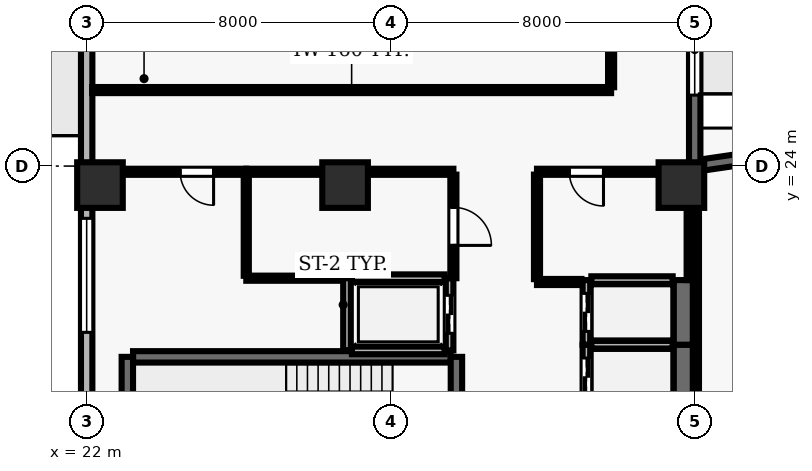
"""IFC4 building model, lengths in metres.
Left out: names, types, materials, properties, quantities, classifications, styles, units other than length and angle.
Written with IfcOpenShell. Run it as: python <this file> out.ifc"""

import sys

from ifc_helpers import new_model, si_unit, direction, frame, frame_2d, origin, origin_2d, place, context, subcontext, project, spatial, rectangle, extrude, element, fill, save


model = new_model("IFC4")
c1 = context("Model", 3, precision=1e-05, world=origin(), true_north=direction((0.0, 1.0)))
c2 = subcontext(c1, "Body", "Model", "MODEL_VIEW")
j1 = project(units=[si_unit("LENGTHUNIT", "METRE"), si_unit("PLANEANGLEUNIT", "RADIAN")], contexts=[c1])
p1 = place(None, origin())
s1 = spatial("IfcSite", under=j1, at=p1, CompositionType="ELEMENT")
p2 = place(p1, origin())
s2 = spatial("IfcBuilding", under=s1, at=p2, CompositionType="ELEMENT")
p3 = place(p2, frame((0.0, 0.0, 146.3)))
s3 = spatial("IfcBuildingStorey", under=s2, at=p3, CompositionType="ELEMENT", Elevation=146.3)
for number, where, z_axis, x_axis in (
    (1, (22.35, 23.5, 0.0), (0.0, 0.0, 1.0), (1.0, 0.0, 0.0)),
    (2, (28.8, 23.5, 0.0), (0.0, 0.0, 1.0), (1.0, 0.0, 0.0)),
    (3, (37.65, 23.5, 0.0), (0.0, 0.0, 1.0), (1.0, 0.0, 0.0)),
):
    element("IfcColumn", number, at=place(p3, frame(where, z_axis=z_axis, x_axis=x_axis)), inside=s3, PredefinedType="COLUMN", context=c2, shape_type="SweptSolid", body=[
        extrude(rectangle(XDim=1.2, YDim=1.2, at=origin_2d()), origin(), (0.0, 0.0, 1.0), 3.9),
    ])
p4 = place(p3, frame((44.846, 25.0, 0.0), z_axis=(0.0, 0.0, 1.0), x_axis=(-0.989499256162, -0.144537960602, 0.0)))
e4 = element("IfcWall", 4, at=p4, inside=s3, PredefinedType="SOLIDWALL", context=c2, shape_type="SweptSolid", body=[
    extrude(rectangle(XDim=6.919, YDim=0.3, at=frame_2d((3.459, 0.0))), origin(), (0.0, 0.0, 1.0), 3.69),
])
p5 = place(p4, frame((2.523, 0.0, 0.9)))
e5 = element("IfcOpeningElement", 5, at=p5, cuts=e4, PredefinedType="OPENING", context=c2, shape_type="SweptSolid", body=[
    extrude(rectangle(XDim=1.8, YDim=1.8, at=frame_2d((0.9, 0.9))), frame((0.0, 0.16, 0.0), z_axis=(0.0, -1.0, 0.0), x_axis=(1.0, 0.0, 0.0)), (0.0, 0.0, 1.0), 0.32),
])
p6 = place(p3, frame((38.0, 24.0, 0.0), z_axis=(0.0, 0.0, 1.0), x_axis=(0.0, 1.0, 0.0)))
e6 = element("IfcWall", 6, at=p6, inside=s3, PredefinedType="SOLIDWALL", context=c2, shape_type="SweptSolid", body=[
    extrude(rectangle(XDim=22.1, YDim=0.3, at=frame_2d((11.05, 0.0))), origin(), (0.0, 0.0, 1.0), 3.69),
])
p7 = place(p6, frame((12.35, 0.0, 0.0)))
e7 = element("IfcOpeningElement", 7, at=p7, cuts=e6, PredefinedType="OPENING", context=c2, shape_type="SweptSolid", body=[
    extrude(rectangle(XDim=1.0, YDim=2.2, at=frame_2d((0.5, 1.1))), frame((0.0, 0.16, 0.0), z_axis=(0.0, -1.0, 0.0), x_axis=(1.0, 0.0, 0.0)), (0.0, 0.0, 1.0), 0.32),
])
p8 = place(p6, frame((1.867, 0.0, 0.9)))
e8 = element("IfcOpeningElement", 8, at=p8, cuts=e6, PredefinedType="OPENING", context=c2, shape_type="SweptSolid", body=[
    extrude(rectangle(XDim=2.4, YDim=1.8, at=frame_2d((1.2, 0.9))), frame((0.0, 0.16, 0.0), z_axis=(0.0, -1.0, 0.0), x_axis=(1.0, 0.0, 0.0)), (0.0, 0.0, 1.0), 0.32),
])
p9 = place(p6, frame((16.833, 0.0, 0.9)))
e9 = element("IfcOpeningElement", 9, at=p9, cuts=e6, PredefinedType="OPENING", context=c2, shape_type="SweptSolid", body=[
    extrude(rectangle(XDim=2.4, YDim=1.8, at=frame_2d((1.2, 0.9))), frame((0.0, 0.16, 0.0), z_axis=(0.0, -1.0, 0.0), x_axis=(1.0, 0.0, 0.0)), (0.0, 0.0, 1.0), 0.32),
])
p10 = place(p3, frame((22.0, 46.1, 0.0), z_axis=(0.0, 0.0, 1.0), x_axis=(0.0, -1.0, 0.0)))
e10 = element("IfcWall", 10, at=p10, inside=s3, PredefinedType="SOLIDWALL", context=c2, shape_type="SweptSolid", body=[
    extrude(rectangle(XDim=43.6, YDim=0.3, at=frame_2d((21.8, 0.0))), origin(), (0.0, 0.0, 1.0), 3.69),
])
p11 = place(p10, frame((12.7, 0.0, 0.0)))
e11 = element("IfcOpeningElement", 11, at=p11, cuts=e10, PredefinedType="OPENING", context=c2, shape_type="SweptSolid", body=[
    extrude(rectangle(XDim=1.0, YDim=2.2, at=frame_2d((0.5, 1.1))), frame((0.0, 0.16, 0.0), z_axis=(0.0, -1.0, 0.0), x_axis=(1.0, 0.0, 0.0)), (0.0, 0.0, 1.0), 0.32),
])
p12 = place(p10, frame((1.225, 0.0, 0.9)))
e12 = element("IfcOpeningElement", 12, at=p12, cuts=e10, PredefinedType="OPENING", context=c2, shape_type="SweptSolid", body=[
    extrude(rectangle(XDim=3.0, YDim=2.2, at=frame_2d((1.5, 1.1))), frame((0.0, 0.16, 0.0), z_axis=(0.0, -1.0, 0.0), x_axis=(1.0, 0.0, 0.0)), (0.0, 0.0, 1.0), 0.32),
])
p13 = place(p10, frame((6.675, 0.0, 0.9)))
e13 = element("IfcOpeningElement", 13, at=p13, cuts=e10, PredefinedType="OPENING", context=c2, shape_type="SweptSolid", body=[
    extrude(rectangle(XDim=3.0, YDim=2.2, at=frame_2d((1.5, 1.1))), frame((0.0, 0.16, 0.0), z_axis=(0.0, -1.0, 0.0), x_axis=(1.0, 0.0, 0.0)), (0.0, 0.0, 1.0), 0.32),
])
p14 = place(p10, frame((23.475, 0.0, 0.9)))
e14 = element("IfcOpeningElement", 14, at=p14, cuts=e10, PredefinedType="OPENING", context=c2, shape_type="SweptSolid", body=[
    extrude(rectangle(XDim=3.0, YDim=2.2, at=frame_2d((1.5, 1.1))), frame((0.0, 0.16, 0.0), z_axis=(0.0, -1.0, 0.0), x_axis=(1.0, 0.0, 0.0)), (0.0, 0.0, 1.0), 0.32),
])
p15 = place(p10, frame((33.925, 0.0, 0.9)))
e15 = element("IfcOpeningElement", 15, at=p15, cuts=e10, PredefinedType="OPENING", context=c2, shape_type="SweptSolid", body=[
    extrude(rectangle(XDim=3.0, YDim=2.2, at=frame_2d((1.5, 1.1))), frame((0.0, 0.16, 0.0), z_axis=(0.0, -1.0, 0.0), x_axis=(1.0, 0.0, 0.0)), (0.0, 0.0, 1.0), 0.32),
])
p16 = place(p3, frame((31.58, 18.98, 0.0), z_axis=(0.0, 0.0, 1.0), x_axis=(-1.0, 0.0, 0.0)))
e16 = element("IfcWall", 16, at=p16, inside=s3, PredefinedType="SHEAR", context=c2, shape_type="SweptSolid", body=[
    extrude(rectangle(XDim=8.36, YDim=0.3, at=frame_2d((4.18, 0.0))), origin(), (0.0, 0.0, 1.0), 3.69),
])
p17 = place(p3, frame((23.07, 18.98, 0.0), z_axis=(0.0, 0.0, 1.0), x_axis=(0.0, -1.0, 0.0)))
e17 = element("IfcWall", 17, at=p17, inside=s3, PredefinedType="SHEAR", context=c2, shape_type="SweptSolid", body=[
    extrude(rectangle(XDim=3.51, YDim=0.3, at=frame_2d((1.755, 0.0))), origin(), (0.0, 0.0, 1.0), 3.69),
])
p18 = place(p3, frame((31.73, 15.47, 0.0), z_axis=(0.0, 0.0, 1.0), x_axis=(0.0, 1.0, 0.0)))
e18 = element("IfcWall", 18, at=p18, inside=s3, PredefinedType="SHEAR", context=c2, shape_type="SweptSolid", body=[
    extrude(rectangle(XDim=3.51, YDim=0.3, at=frame_2d((1.755, 0.0))), origin(), (0.0, 0.0, 1.0), 3.69),
])
p19 = place(p18, frame((1.18, 0.0, 0.0)))
e19 = element("IfcOpeningElement", 19, at=p19, cuts=e18, PredefinedType="OPENING", context=c2, shape_type="SweptSolid", body=[
    extrude(rectangle(XDim=1.15, YDim=2.15, at=frame_2d((0.575, 1.075))), frame((0.0, 0.16, 0.0), z_axis=(0.0, -1.0, 0.0), x_axis=(1.0, 0.0, 0.0)), (0.0, 0.0, 1.0), 0.32),
])
p20 = place(p3, frame((35.15, 19.3, 0.0), z_axis=(0.0, 0.0, 1.0), x_axis=(0.0, -1.0, 0.0)))
e20 = element("IfcWall", 20, at=p20, inside=s3, PredefinedType="SOLIDWALL", context=c2, shape_type="SweptSolid", body=[
    extrude(rectangle(XDim=1.7, YDim=0.2, at=frame_2d((0.85, 0.0))), origin(), (0.0, 0.0, 1.0), 3.69),
])
p21 = place(p20, frame((0.35, 0.0, 0.0)))
e21 = element("IfcOpeningElement", 21, at=p21, cuts=e20, PredefinedType="OPENING", context=c2, shape_type="SweptSolid", body=[
    extrude(rectangle(XDim=1.0, YDim=2.1, at=frame_2d((0.5, 1.05))), frame((0.0, 0.11, 0.0), z_axis=(0.0, -1.0, 0.0), x_axis=(1.0, 0.0, 0.0)), (0.0, 0.0, 1.0), 0.22),
])
p22 = place(p3, frame((37.7, 17.6, 0.0), z_axis=(0.0, 0.0, 1.0), x_axis=(0.0, 1.0, 0.0)))
e22 = element("IfcWall", 22, at=p22, inside=s3, PredefinedType="SHEAR", context=c2, shape_type="SweptSolid", body=[
    extrude(rectangle(XDim=1.7, YDim=0.5, at=frame_2d((0.85, 0.0))), origin(), (0.0, 0.0, 1.0), 3.69),
])
p23 = place(p3, frame((37.42, 19.3, 0.0), z_axis=(0.0, 0.0, 1.0), x_axis=(-1.0, 0.0, 0.0)))
e23 = element("IfcWall", 23, at=p23, inside=s3, PredefinedType="SOLIDWALL", context=c2, shape_type="SweptSolid", body=[
    extrude(rectangle(XDim=2.14, YDim=0.2, at=frame_2d((1.07, 0.0))), origin(), (0.0, 0.0, 1.0), 3.69),
])
p24 = place(p3, frame((35.15, 21.0, 0.0), z_axis=(0.0, 0.0, 1.0), x_axis=(0.0, -1.0, 0.0)))
e24 = element("IfcWall", 24, at=p24, inside=s3, PredefinedType="SOLIDWALL", context=c2, shape_type="SweptSolid", body=[
    extrude(rectangle(XDim=1.7, YDim=0.2, at=frame_2d((0.85, 0.0))), origin(), (0.0, 0.0, 1.0), 3.69),
])
p25 = place(p24, frame((0.35, 0.0, 0.0)))
e25 = element("IfcOpeningElement", 25, at=p25, cuts=e24, PredefinedType="OPENING", context=c2, shape_type="SweptSolid", body=[
    extrude(rectangle(XDim=1.0, YDim=2.1, at=frame_2d((0.5, 1.05))), frame((0.0, 0.11, 0.0), z_axis=(0.0, -1.0, 0.0), x_axis=(1.0, 0.0, 0.0)), (0.0, 0.0, 1.0), 0.22),
])
p26 = place(p3, frame((37.7, 19.3, 0.0), z_axis=(0.0, 0.0, 1.0), x_axis=(0.0, 1.0, 0.0)))
e26 = element("IfcWall", 26, at=p26, inside=s3, PredefinedType="SHEAR", context=c2, shape_type="SweptSolid", body=[
    extrude(rectangle(XDim=1.7, YDim=0.5, at=frame_2d((0.85, 0.0))), origin(), (0.0, 0.0, 1.0), 3.69),
])
p27 = place(p3, frame((37.42, 21.0, 0.0), z_axis=(0.0, 0.0, 1.0), x_axis=(-1.0, 0.0, 0.0)))
e27 = element("IfcWall", 27, at=p27, inside=s3, PredefinedType="SOLIDWALL", context=c2, shape_type="SweptSolid", body=[
    extrude(rectangle(XDim=2.14, YDim=0.2, at=frame_2d((1.07, 0.0))), origin(), (0.0, 0.0, 1.0), 3.69),
])
p28 = place(p3, frame((28.85, 21.05, 0.0), z_axis=(0.0, 0.0, 1.0), x_axis=(0.0, -1.0, 0.0)))
e28 = element("IfcWall", 28, at=p28, inside=s3, PredefinedType="SOLIDWALL", context=c2, shape_type="SweptSolid", body=[
    extrude(rectangle(XDim=1.9, YDim=0.2, at=frame_2d((0.95, 0.0))), origin(), (0.0, 0.0, 1.0), 3.69),
])
p29 = place(p3, frame((31.55, 19.15, 0.0), z_axis=(0.0, 0.0, 1.0), x_axis=(0.0, 1.0, 0.0)))
e29 = element("IfcWall", 29, at=p29, inside=s3, PredefinedType="SOLIDWALL", context=c2, shape_type="SweptSolid", body=[
    extrude(rectangle(XDim=1.9, YDim=0.2, at=frame_2d((0.95, 0.0))), origin(), (0.0, 0.0, 1.0), 3.69),
])
p30 = place(p29, frame((0.45, 0.0, 0.0)))
e30 = element("IfcOpeningElement", 30, at=p30, cuts=e29, PredefinedType="OPENING", context=c2, shape_type="SweptSolid", body=[
    extrude(rectangle(XDim=1.0, YDim=2.1, at=frame_2d((0.5, 1.05))), frame((0.0, 0.11, 0.0), z_axis=(0.0, -1.0, 0.0), x_axis=(1.0, 0.0, 0.0)), (0.0, 0.0, 1.0), 0.22),
])
for number, where, z_axis, x_axis in (
    (31, (28.98, 19.15, 0.0), (0.0, 0.0, 1.0), (1.0, 0.0, 0.0)),
    (32, (31.42, 21.05, 0.0), (0.0, 0.0, 1.0), (-1.0, 0.0, 0.0)),
):
    element("IfcWall", number, at=place(p3, frame(where, z_axis=z_axis, x_axis=x_axis)), inside=s3, PredefinedType="SOLIDWALL", context=c2, shape_type="SweptSolid", body=[
        extrude(rectangle(XDim=2.44, YDim=0.2, at=frame_2d((1.22, 0.0))), origin(), (0.0, 0.0, 1.0), 3.69),
    ])
p31 = place(p3, frame((26.2, 21.05, 0.0), z_axis=(0.0, 0.0, 1.0), x_axis=(1.0, 0.0, 0.0)))
e33 = element("IfcWall", 33, at=p31, inside=s3, PredefinedType="PARTITIONING", context=c2, shape_type="SweptSolid", body=[
    extrude(rectangle(XDim=2.52, YDim=0.135, at=frame_2d((1.26, 0.0))), origin(), (0.0, 0.0, 1.0), 3.69),
])
p32 = place(p3, frame((26.2, 23.85, 0.0), z_axis=(0.0, 0.0, 1.0), x_axis=(-1.0, 0.0, 0.0)))
e34 = element("IfcWall", 34, at=p32, inside=s3, PredefinedType="PARTITIONING", context=c2, shape_type="SweptSolid", body=[
    extrude(rectangle(XDim=4.0, YDim=0.16, at=frame_2d((2.0, 0.0))), origin(), (0.0, 0.0, 1.0), 3.073),
])
p33 = place(p32, frame((0.86, 0.0, 0.0)))
e35 = element("IfcOpeningElement", 35, at=p33, cuts=e34, PredefinedType="OPENING", context=c2, shape_type="SweptSolid", body=[
    extrude(rectangle(XDim=0.88, YDim=2.1, at=frame_2d((0.44, 1.05))), frame((0.0, 0.09, 0.0), z_axis=(0.0, -1.0, 0.0), x_axis=(1.0, 0.0, 0.0)), (0.0, 0.0, 1.0), 0.18),
])
p34 = place(p3, frame((31.65, 23.85, 0.0), z_axis=(0.0, 0.0, 1.0), x_axis=(-1.0, 0.0, 0.0)))
e36 = element("IfcWall", 36, at=p34, inside=s3, PredefinedType="PARTITIONING", context=c2, shape_type="SweptSolid", body=[
    extrude(rectangle(XDim=5.45, YDim=0.16, at=frame_2d((2.725, 0.0))), origin(), (0.0, 0.0, 1.0), 3.073),
])
p35 = place(p3, frame((35.02, 20.95, 0.0), z_axis=(0.0, 0.0, 1.0), x_axis=(-1.0, 0.0, 0.0)))
e37 = element("IfcWall", 37, at=p35, inside=s3, PredefinedType="PARTITIONING", context=c2, shape_type="SweptSolid", body=[
    extrude(rectangle(XDim=1.17, YDim=0.16, at=frame_2d((0.585, 0.0))), origin(), (0.0, 0.0, 1.0), 3.69),
])
p36 = place(p3, frame((35.8, 26.0, 0.0), z_axis=(0.0, 0.0, 1.0), x_axis=(-1.0, 0.0, 0.0)))
e38 = element("IfcWall", 38, at=p36, inside=s3, PredefinedType="PARTITIONING", context=c2, shape_type="SweptSolid", body=[
    extrude(rectangle(XDim=13.655, YDim=0.16, at=frame_2d((6.828, 0.0))), origin(), (0.0, 0.0, 1.0), 3.69),
])
p37 = place(p3, frame((37.85, 23.85, 0.0), z_axis=(0.0, 0.0, 1.0), x_axis=(-1.0, 0.0, 0.0)))
e39 = element("IfcWall", 39, at=p37, inside=s3, PredefinedType="PARTITIONING", context=c2, shape_type="SweptSolid", body=[
    extrude(rectangle(XDim=4.0, YDim=0.16, at=frame_2d((2.0, 0.0))), origin(), (0.0, 0.0, 1.0), 3.073),
])
p38 = place(p37, frame((2.25, 0.0, 0.0)))
e40 = element("IfcOpeningElement", 40, at=p38, cuts=e39, PredefinedType="OPENING", context=c2, shape_type="SweptSolid", body=[
    extrude(rectangle(XDim=0.9, YDim=2.1, at=frame_2d((0.45, 1.05))), frame((0.0, 0.09, 0.0), z_axis=(0.0, -1.0, 0.0), x_axis=(1.0, 0.0, 0.0)), (0.0, 0.0, 1.0), 0.18),
])
p39 = place(p3, frame((26.2, 23.775, 0.0), z_axis=(0.0, 0.0, 1.0), x_axis=(0.0, -1.0, 0.0)))
e41 = element("IfcWall", 41, at=p39, inside=s3, PredefinedType="PARTITIONING", context=c2, shape_type="SweptSolid", body=[
    extrude(rectangle(XDim=2.662, YDim=0.135, at=frame_2d((1.331, 0.0))), origin(), (0.0, 0.0, 1.0), 3.69),
])
p40 = place(p3, frame((31.65, 23.775, 0.0), z_axis=(0.0, 0.0, 1.0), x_axis=(0.0, -1.0, 0.0)))
e42 = element("IfcWall", 42, at=p40, inside=s3, PredefinedType="PARTITIONING", context=c2, shape_type="SweptSolid", body=[
    extrude(rectangle(XDim=2.725, YDim=0.16, at=frame_2d((1.362, 0.0))), origin(), (0.0, 0.0, 1.0), 3.69),
])
p41 = place(p40, frame((0.862, 0.0, 0.0)))
e43 = element("IfcOpeningElement", 43, at=p41, cuts=e42, PredefinedType="OPENING", context=c2, shape_type="SweptSolid", body=[
    extrude(rectangle(XDim=1.0, YDim=2.1, at=frame_2d((0.5, 1.05))), frame((0.0, 0.09, 0.0), z_axis=(0.0, -1.0, 0.0), x_axis=(1.0, 0.0, 0.0)), (0.0, 0.0, 1.0), 0.18),
])
p42 = place(p3, frame((33.85, 21.025, 0.0), z_axis=(0.0, 0.0, 1.0), x_axis=(0.0, 1.0, 0.0)))
e44 = element("IfcWall", 44, at=p42, inside=s3, PredefinedType="PARTITIONING", context=c2, shape_type="SweptSolid", body=[
    extrude(rectangle(XDim=2.75, YDim=0.16, at=frame_2d((1.375, 0.0))), origin(), (0.0, 0.0, 1.0), 3.69),
])
p43 = place(p3, frame((35.8, 48.095, 0.0), z_axis=(0.0, 0.0, 1.0), x_axis=(0.0, -1.0, 0.0)))
e45 = element("IfcWall", 45, at=p43, inside=s3, PredefinedType="PARTITIONING", context=c2, shape_type="SweptSolid", body=[
    extrude(rectangle(XDim=22.02, YDim=0.16, at=frame_2d((11.01, 0.0))), origin(), (0.0, 0.0, 1.0), 3.69),
])
p44 = place(p43, frame((10.56, 0.0, 0.0)))
e46 = element("IfcOpeningElement", 46, at=p44, cuts=e45, PredefinedType="OPENING", context=c2, shape_type="SweptSolid", body=[
    extrude(rectangle(XDim=0.9, YDim=2.1, at=frame_2d((0.45, 1.05))), frame((0.0, 0.09, 0.0), z_axis=(0.0, -1.0, 0.0), x_axis=(1.0, 0.0, 0.0)), (0.0, 0.0, 1.0), 0.18),
])
p45 = place(p3, frame((37.85, 21.0, 0.0), z_axis=(0.0, 0.0, 1.0), x_axis=(0.0, 1.0, 0.0)))
e47 = element("IfcWall", 47, at=p45, inside=s3, PredefinedType="PARTITIONING", context=c2, shape_type="SweptSolid", body=[
    extrude(rectangle(XDim=2.775, YDim=0.125, at=frame_2d((1.387, 0.0))), origin(), (0.0, 0.0, 1.0), 3.073),
])
p46 = place(p3, frame((38.05, 23.861, 0.0), z_axis=(0.0, 0.0, 1.0), x_axis=(0.0, -1.0, 0.0)))
e48 = element("IfcWall", 48, at=p46, inside=s3, PredefinedType="PARTITIONING", context=c2, shape_type="SweptSolid", body=[
    extrude(rectangle(XDim=7.786, YDim=0.125, at=frame_2d((3.893, 0.0))), origin(), (0.0, 0.0, 1.0), 3.073),
])
p47 = place(p8, origin())
e49 = element("IfcWindow", 49, at=p47, inside=s3, PartitioningType="SINGLE_PANEL", PredefinedType="WINDOW", context=c2, shape_type="SweptSolid", body=[
    extrude(rectangle(XDim=2.4, YDim=1.8, at=frame_2d((1.2, 0.9))), frame((0.0, 0.03, 0.0), z_axis=(0.0, -1.0, 0.0), x_axis=(1.0, 0.0, 0.0)), (0.0, 0.0, 1.0), 0.06),
])
fill(e8, e49)
p48 = place(p14, origin())
e50 = element("IfcWindow", 50, at=p48, inside=s3, PartitioningType="SINGLE_PANEL", PredefinedType="WINDOW", context=c2, shape_type="SweptSolid", body=[
    extrude(rectangle(XDim=3.0, YDim=2.2, at=frame_2d((1.5, 1.1))), frame((0.0, 0.03, 0.0), z_axis=(0.0, -1.0, 0.0), x_axis=(1.0, 0.0, 0.0)), (0.0, 0.0, 1.0), 0.06),
])
fill(e14, e50)
p49 = place(p21, origin())
e51 = element("IfcDoor", 51, at=p49, inside=s3, OperationType="DOUBLE_DOOR_SLIDING", PredefinedType="DOOR", context=c2, shape_type="SweptSolid", body=[
    extrude(rectangle(XDim=1.0, YDim=2.1, at=frame_2d((0.5, 1.05))), frame((0.0, 0.025, 0.0), z_axis=(0.0, -1.0, 0.0), x_axis=(1.0, 0.0, 0.0)), (0.0, 0.0, 1.0), 0.05),
])
fill(e21, e51)
p50 = place(p25, origin())
e52 = element("IfcDoor", 52, at=p50, inside=s3, OperationType="DOUBLE_DOOR_SLIDING", PredefinedType="DOOR", context=c2, shape_type="SweptSolid", body=[
    extrude(rectangle(XDim=1.0, YDim=2.1, at=frame_2d((0.5, 1.05))), frame((0.0, 0.025, 0.0), z_axis=(0.0, -1.0, 0.0), x_axis=(1.0, 0.0, 0.0)), (0.0, 0.0, 1.0), 0.05),
])
fill(e25, e52)
p51 = place(p30, origin())
e53 = element("IfcDoor", 53, at=p51, inside=s3, OperationType="DOUBLE_DOOR_SLIDING", PredefinedType="DOOR", context=c2, shape_type="SweptSolid", body=[
    extrude(rectangle(XDim=1.0, YDim=2.1, at=frame_2d((0.5, 1.05))), frame((0.0, 0.025, 0.0), z_axis=(0.0, -1.0, 0.0), x_axis=(1.0, 0.0, 0.0)), (0.0, 0.0, 1.0), 0.05),
])
fill(e30, e53)
p52 = place(p38, origin())
e54 = element("IfcDoor", 54, at=p52, inside=s3, OperationType="SINGLE_SWING_LEFT", PredefinedType="DOOR", context=c2, shape_type="SweptSolid", body=[
    extrude(rectangle(XDim=0.9, YDim=2.1, at=frame_2d((0.45, 1.05))), frame((0.0, 0.025, 0.0), z_axis=(0.0, -1.0, 0.0), x_axis=(1.0, 0.0, 0.0)), (0.0, 0.0, 1.0), 0.05),
])
fill(e40, e54)
p53 = place(p41, origin())
e55 = element("IfcDoor", 55, at=p53, inside=s3, OperationType="SINGLE_SWING_RIGHT", PredefinedType="DOOR", context=c2, shape_type="SweptSolid", body=[
    extrude(rectangle(XDim=1.0, YDim=2.1, at=frame_2d((0.5, 1.05))), frame((0.0, 0.025, 0.0), z_axis=(0.0, -1.0, 0.0), x_axis=(1.0, 0.0, 0.0)), (0.0, 0.0, 1.0), 0.05),
])
fill(e43, e55)
p54 = place(p33, origin())
e56 = element("IfcDoor", 56, at=p54, inside=s3, OperationType="SINGLE_SWING_LEFT", PredefinedType="DOOR", context=c2, shape_type="SweptSolid", body=[
    extrude(rectangle(XDim=0.88, YDim=2.1, at=frame_2d((0.44, 1.05))), frame((0.0, 0.025, 0.0), z_axis=(0.0, -1.0, 0.0), x_axis=(1.0, 0.0, 0.0)), (0.0, 0.0, 1.0), 0.05),
])
fill(e35, e56)
save(model, sys.argv[1])
